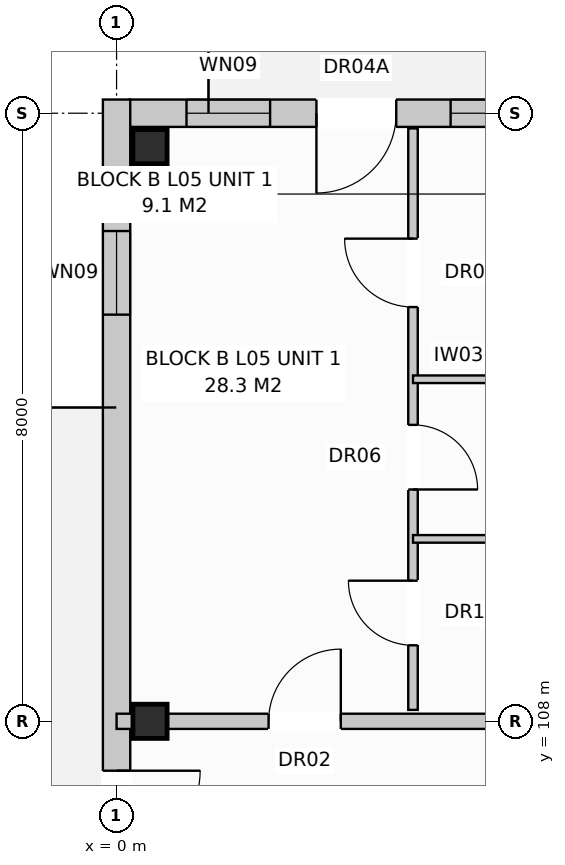
"""IFC4 building model, lengths in metres.
Left out: names, types, materials, properties, quantities, classifications, styles, units other than length and angle.
Written with IfcOpenShell. Run it as: python <this file> out.ifc"""

import sys

from ifc_helpers import new_model, si_unit, direction, frame, frame_2d, origin, origin_with_axes, origin_2d, place, context, subcontext, project, spatial, rectangle, extrude, element, fill, save


model = new_model("IFC4")
c1 = context("Model", 3, precision=1e-05, world=origin(), true_north=direction((0.0, 1.0)))
c2 = subcontext(c1, "Body", "Model", "MODEL_VIEW")
j1 = project(units=[si_unit("LENGTHUNIT", "METRE"), si_unit("PLANEANGLEUNIT", "RADIAN")], contexts=[c1])
p1 = place(None, origin())
s1 = spatial("IfcSite", under=j1, at=p1, CompositionType="ELEMENT")
p2 = place(p1, origin())
s2 = spatial("IfcBuilding", under=s1, at=p2, CompositionType="ELEMENT")
p3 = place(p2, frame((0.0, 0.0, 17.6)))
s3 = spatial("IfcBuildingStorey", under=s2, at=p3, CompositionType="ELEMENT", Elevation=17.6)
for number, where, z_axis, x_axis in (
    (1, (0.44, 108.0, 0.0), (0.0, 0.0, 1.0), (1.0, 0.0, 0.0)),
    (2, (0.44, 115.56, 0.0), (0.0, 0.0, 1.0), (1.0, 0.0, 0.0)),
):
    element("IfcColumn", number, at=place(p3, frame(where, z_axis=z_axis, x_axis=x_axis)), inside=s3, PredefinedType="COLUMN", context=c2, shape_type="SweptSolid", body=[
        extrude(rectangle(XDim=0.45, YDim=0.45, at=origin_2d()), origin(), (0.0, 0.0, 1.0), 3.2),
    ])
p4 = place(p3, frame((0.17, 116.0, 0.0), z_axis=(0.0, 0.0, 1.0), x_axis=(1.0, 0.0, 0.0)))
e3 = element("IfcWall", 3, at=p4, inside=s3, PredefinedType="STANDARD", context=c2, shape_type="SweptSolid", body=[
    extrude(rectangle(XDim=54.86, YDim=0.36, at=frame_2d((27.43, 0.0))), origin(), (0.0, 0.0, 1.0), 2.95),
])
p5 = place(p4, frame((2.459, 0.0, 0.0)))
e4 = element("IfcOpeningElement", 4, at=p5, cuts=e3, PredefinedType="OPENING", context=c2, shape_type="SweptSolid", body=[
    extrude(rectangle(XDim=1.05, YDim=2.12, at=frame_2d((0.525, 1.06))), frame((0.0, 0.192, 0.0), z_axis=(0.0, -1.0, 0.0), x_axis=(1.0, 0.0, 0.0)), (0.0, 0.0, 1.0), 0.384),
])
p6 = place(p4, frame((18.85, 0.0, 0.0)))
e5 = element("IfcOpeningElement", 5, at=p6, cuts=e3, PredefinedType="OPENING", context=c2, shape_type="SweptSolid", body=[
    extrude(rectangle(XDim=1.05, YDim=2.12, at=frame_2d((0.525, 1.06))), frame((0.0, 0.192, 0.0), z_axis=(0.0, -1.0, 0.0), x_axis=(1.0, 0.0, 0.0)), (0.0, 0.0, 1.0), 0.384),
])
p7 = place(p4, frame((28.76, 0.0, 0.0)))
e6 = element("IfcOpeningElement", 6, at=p7, cuts=e3, PredefinedType="OPENING", context=c2, shape_type="SweptSolid", body=[
    extrude(rectangle(XDim=1.05, YDim=2.12, at=frame_2d((0.525, 1.06))), frame((0.0, 0.192, 0.0), z_axis=(0.0, -1.0, 0.0), x_axis=(1.0, 0.0, 0.0)), (0.0, 0.0, 1.0), 0.384),
])
p8 = place(p4, frame((46.45, 0.0, 0.0)))
e7 = element("IfcOpeningElement", 7, at=p8, cuts=e3, PredefinedType="OPENING", context=c2, shape_type="SweptSolid", body=[
    extrude(rectangle(XDim=1.05, YDim=2.12, at=frame_2d((0.525, 1.06))), frame((0.0, 0.192, 0.0), z_axis=(0.0, -1.0, 0.0), x_axis=(1.0, 0.0, 0.0)), (0.0, 0.0, 1.0), 0.384),
])
p9 = place(p4, frame((0.75, 0.0, 0.72)))
e8 = element("IfcOpeningElement", 8, at=p9, cuts=e3, PredefinedType="OPENING", context=c2, shape_type="SweptSolid", body=[
    extrude(rectangle(XDim=1.1, YDim=1.5, at=frame_2d((0.55, 0.75))), frame((0.0, 0.192, 0.0), z_axis=(0.0, -1.0, 0.0), x_axis=(1.0, 0.0, 0.0)), (0.0, 0.0, 1.0), 0.384),
])
p10 = place(p4, frame((4.225, 0.0, 0.8)))
e9 = element("IfcOpeningElement", 9, at=p10, cuts=e3, PredefinedType="OPENING", context=c2, shape_type="SweptSolid", body=[
    extrude(rectangle(XDim=1.95, YDim=1.65, at=frame_2d((0.975, 0.825))), frame((0.0, 0.192, 0.0), z_axis=(0.0, -1.0, 0.0), x_axis=(1.0, 0.0, 0.0)), (0.0, 0.0, 1.0), 0.384),
])
p11 = place(p4, frame((8.0, 0.0, 0.8)))
e10 = element("IfcOpeningElement", 10, at=p11, cuts=e3, PredefinedType="OPENING", context=c2, shape_type="SweptSolid", body=[
    extrude(rectangle(XDim=1.8, YDim=1.7, at=frame_2d((0.9, 0.85))), frame((0.0, 0.192, 0.0), z_axis=(0.0, -1.0, 0.0), x_axis=(1.0, 0.0, 0.0)), (0.0, 0.0, 1.0), 0.384),
])
p12 = place(p4, frame((11.65, 0.0, 0.72)))
e11 = element("IfcOpeningElement", 11, at=p12, cuts=e3, PredefinedType="OPENING", context=c2, shape_type="SweptSolid", body=[
    extrude(rectangle(XDim=1.1, YDim=1.5, at=frame_2d((0.55, 0.75))), frame((0.0, 0.192, 0.0), z_axis=(0.0, -1.0, 0.0), x_axis=(1.0, 0.0, 0.0)), (0.0, 0.0, 1.0), 0.384),
])
p13 = place(p4, frame((16.675, 0.0, 0.8)))
e12 = element("IfcOpeningElement", 12, at=p13, cuts=e3, PredefinedType="OPENING", context=c2, shape_type="SweptSolid", body=[
    extrude(rectangle(XDim=1.95, YDim=1.65, at=frame_2d((0.975, 0.825))), frame((0.0, 0.192, 0.0), z_axis=(0.0, -1.0, 0.0), x_axis=(1.0, 0.0, 0.0)), (0.0, 0.0, 1.0), 0.384),
])
p14 = place(p4, frame((22.3, 0.0, 0.8)))
e13 = element("IfcOpeningElement", 13, at=p14, cuts=e3, PredefinedType="OPENING", context=c2, shape_type="SweptSolid", body=[
    extrude(rectangle(XDim=1.8, YDim=1.7, at=frame_2d((0.9, 0.85))), frame((0.0, 0.192, 0.0), z_axis=(0.0, -1.0, 0.0), x_axis=(1.0, 0.0, 0.0)), (0.0, 0.0, 1.0), 0.384),
])
p15 = place(p4, frame((31.15, 0.0, 0.72)))
e14 = element("IfcOpeningElement", 14, at=p15, cuts=e3, PredefinedType="OPENING", context=c2, shape_type="SweptSolid", body=[
    extrude(rectangle(XDim=1.9, YDim=1.85, at=frame_2d((0.95, 0.925))), frame((0.0, 0.192, 0.0), z_axis=(0.0, -1.0, 0.0), x_axis=(1.0, 0.0, 0.0)), (0.0, 0.0, 1.0), 0.384),
])
p16 = place(p4, frame((36.525, 0.0, 0.8)))
e15 = element("IfcOpeningElement", 15, at=p16, cuts=e3, PredefinedType="OPENING", context=c2, shape_type="SweptSolid", body=[
    extrude(rectangle(XDim=1.95, YDim=1.65, at=frame_2d((0.975, 0.825))), frame((0.0, 0.192, 0.0), z_axis=(0.0, -1.0, 0.0), x_axis=(1.0, 0.0, 0.0)), (0.0, 0.0, 1.0), 0.384),
])
p17 = place(p4, frame((42.3, 0.0, 0.8)))
e16 = element("IfcOpeningElement", 16, at=p17, cuts=e3, PredefinedType="OPENING", context=c2, shape_type="SweptSolid", body=[
    extrude(rectangle(XDim=1.8, YDim=1.7, at=frame_2d((0.9, 0.85))), frame((0.0, 0.192, 0.0), z_axis=(0.0, -1.0, 0.0), x_axis=(1.0, 0.0, 0.0)), (0.0, 0.0, 1.0), 0.384),
])
p18 = place(p4, frame((49.05, 0.0, 0.72)))
e17 = element("IfcOpeningElement", 17, at=p18, cuts=e3, PredefinedType="OPENING", context=c2, shape_type="SweptSolid", body=[
    extrude(rectangle(XDim=1.1, YDim=1.5, at=frame_2d((0.55, 0.75))), frame((0.0, 0.192, 0.0), z_axis=(0.0, -1.0, 0.0), x_axis=(1.0, 0.0, 0.0)), (0.0, 0.0, 1.0), 0.384),
])
p19 = place(p4, frame((52.025, 0.0, 0.8)))
e18 = element("IfcOpeningElement", 18, at=p19, cuts=e3, PredefinedType="OPENING", context=c2, shape_type="SweptSolid", body=[
    extrude(rectangle(XDim=1.95, YDim=1.65, at=frame_2d((0.975, 0.825))), frame((0.0, 0.192, 0.0), z_axis=(0.0, -1.0, 0.0), x_axis=(1.0, 0.0, 0.0)), (0.0, 0.0, 1.0), 0.384),
])
p20 = place(p3, frame((0.0, 97.42, 0.0), z_axis=(0.0, 0.0, 1.0), x_axis=(0.0, 1.0, 0.0)))
e19 = element("IfcWall", 19, at=p20, inside=s3, PredefinedType="STANDARD", context=c2, shape_type="SweptSolid", body=[
    extrude(rectangle(XDim=18.76, YDim=0.36, at=frame_2d((9.38, 0.0))), origin(), (0.0, 0.0, 1.0), 2.95),
])
p21 = place(p20, frame((8.83, 0.0, 0.0)))
e20 = element("IfcOpeningElement", 20, at=p21, cuts=e19, PredefinedType="OPENING", context=c2, shape_type="SweptSolid", body=[
    extrude(rectangle(XDim=1.1, YDim=2.1, at=frame_2d((0.55, 1.05))), frame((0.0, 0.192, 0.0), z_axis=(0.0, -1.0, 0.0), x_axis=(1.0, 0.0, 0.0)), (0.0, 0.0, 1.0), 0.384),
])
p22 = place(p20, frame((1.73, 0.0, 0.72)))
e21 = element("IfcOpeningElement", 21, at=p22, cuts=e19, PredefinedType="OPENING", context=c2, shape_type="SweptSolid", body=[
    extrude(rectangle(XDim=1.1, YDim=1.5, at=frame_2d((0.55, 0.75))), frame((0.0, 0.192, 0.0), z_axis=(0.0, -1.0, 0.0), x_axis=(1.0, 0.0, 0.0)), (0.0, 0.0, 1.0), 0.384),
])
p23 = place(p20, frame((15.93, 0.0, 0.72)))
e22 = element("IfcOpeningElement", 22, at=p23, cuts=e19, PredefinedType="OPENING", context=c2, shape_type="SweptSolid", body=[
    extrude(rectangle(XDim=1.1, YDim=1.5, at=frame_2d((0.55, 0.75))), frame((0.0, 0.192, 0.0), z_axis=(0.0, -1.0, 0.0), x_axis=(1.0, 0.0, 0.0)), (0.0, 0.0, 1.0), 0.384),
])
p24 = place(p3, frame((0.0, 108.0, 0.0), z_axis=(0.0, 0.0, 1.0), x_axis=(1.0, 0.0, 0.0)))
e23 = element("IfcWall", 23, at=p24, inside=s3, PredefinedType="PARTITIONING", context=c2, shape_type="SweptSolid", body=[
    extrude(rectangle(XDim=6.9, YDim=0.2, at=frame_2d((3.45, 0.0))), origin(), (0.0, 0.0, 1.0), 2.39),
])
p25 = place(p24, frame((2.0, 0.0, 0.0)))
e24 = element("IfcOpeningElement", 24, at=p25, cuts=e23, PredefinedType="OPENING", context=c2, shape_type="SweptSolid", body=[
    extrude(rectangle(XDim=0.95, YDim=2.15, at=frame_2d((0.475, 1.075))), frame((0.0, 0.112, 0.0), z_axis=(0.0, -1.0, 0.0), x_axis=(1.0, 0.0, 0.0)), (0.0, 0.0, 1.0), 0.224),
])
p26 = place(p3, frame((3.9, 108.15, 0.0), z_axis=(0.0, 0.0, 1.0), x_axis=(0.0, 1.0, 0.0)))
e25 = element("IfcWall", 25, at=p26, inside=s3, PredefinedType="PARTITIONING", context=c2, shape_type="SweptSolid", body=[
    extrude(rectangle(XDim=7.65, YDim=0.125, at=frame_2d((3.825, 0.0))), origin(), (0.0, 0.0, 1.0), 2.95),
])
p27 = place(p26, frame((0.85, 0.0, 0.0)))
e26 = element("IfcOpeningElement", 26, at=p27, cuts=e25, PredefinedType="OPENING", context=c2, shape_type="SweptSolid", body=[
    extrude(rectangle(XDim=0.85, YDim=2.1, at=frame_2d((0.425, 1.05))), frame((0.0, 0.074, 0.0), z_axis=(0.0, -1.0, 0.0), x_axis=(1.0, 0.0, 0.0)), (0.0, 0.0, 1.0), 0.149),
])
p28 = place(p26, frame((2.9, 0.0, 0.0)))
e27 = element("IfcOpeningElement", 27, at=p28, cuts=e25, PredefinedType="OPENING", context=c2, shape_type="SweptSolid", body=[
    extrude(rectangle(XDim=0.85, YDim=2.05, at=frame_2d((0.425, 1.025))), frame((0.0, 0.074, 0.0), z_axis=(0.0, -1.0, 0.0), x_axis=(1.0, 0.0, 0.0)), (0.0, 0.0, 1.0), 0.149),
])
p29 = place(p26, frame((5.3, 0.0, 0.0)))
e28 = element("IfcOpeningElement", 28, at=p29, cuts=e25, PredefinedType="OPENING", context=c2, shape_type="SweptSolid", body=[
    extrude(rectangle(XDim=0.9, YDim=2.1, at=frame_2d((0.45, 1.05))), frame((0.0, 0.074, 0.0), z_axis=(0.0, -1.0, 0.0), x_axis=(1.0, 0.0, 0.0)), (0.0, 0.0, 1.0), 0.149),
])
for number, where, z_axis, x_axis in (
    (29, (3.9, 110.4, 0.0), (0.0, 0.0, 1.0), (1.0, 0.0, 0.0)),
    (30, (3.9, 112.5, 0.0), (0.0, 0.0, 1.0), (1.0, 0.0, 0.0)),
):
    element("IfcWall", number, at=place(p3, frame(where, z_axis=z_axis, x_axis=x_axis)), inside=s3, PredefinedType="PARTITIONING", context=c2, shape_type="SweptSolid", body=[
        extrude(rectangle(XDim=2.9, YDim=0.1, at=frame_2d((1.45, 0.0))), origin(), (0.0, 0.0, 1.0), 2.95),
    ])
p30 = place(p5, frame((1.05, 0.0, 0.0), z_axis=(0.0, 0.0, 1.0), x_axis=(-1.0, 0.0, 0.0)))
e31 = element("IfcDoor", 31, at=p30, inside=s3, OperationType="SINGLE_SWING_LEFT", PredefinedType="DOOR", context=c2, shape_type="SweptSolid", body=[
    extrude(rectangle(XDim=1.05, YDim=2.12, at=frame_2d((0.525, 1.06))), frame((0.0, 0.025, 0.0), z_axis=(0.0, -1.0, 0.0), x_axis=(1.0, 0.0, 0.0)), (0.0, 0.0, 1.0), 0.05),
])
fill(e4, e31)
p31 = place(p9, origin_with_axes())
e32 = element("IfcWindow", 32, at=p31, inside=s3, PartitioningType="SINGLE_PANEL", PredefinedType="WINDOW", context=c2, shape_type="SweptSolid", body=[
    extrude(rectangle(XDim=1.1, YDim=1.5, at=frame_2d((0.55, 0.75))), frame((0.0, 0.03, 0.0), z_axis=(0.0, -1.0, 0.0), x_axis=(1.0, 0.0, 0.0)), (0.0, 0.0, 1.0), 0.06),
])
fill(e8, e32)
p32 = place(p10, origin_with_axes())
e33 = element("IfcWindow", 33, at=p32, inside=s3, PartitioningType="SINGLE_PANEL", PredefinedType="WINDOW", context=c2, shape_type="SweptSolid", body=[
    extrude(rectangle(XDim=1.95, YDim=1.65, at=frame_2d((0.975, 0.825))), frame((0.0, 0.03, 0.0), z_axis=(0.0, -1.0, 0.0), x_axis=(1.0, 0.0, 0.0)), (0.0, 0.0, 1.0), 0.06),
])
fill(e9, e33)
p33 = place(p21, frame((1.1, 0.0, 0.0), z_axis=(0.0, 0.0, 1.0), x_axis=(-1.0, 0.0, 0.0)))
e34 = element("IfcDoor", 34, at=p33, inside=s3, OperationType="SINGLE_SWING_RIGHT", PredefinedType="DOOR", context=c2, shape_type="SweptSolid", body=[
    extrude(rectangle(XDim=1.1, YDim=2.1, at=frame_2d((0.55, 1.05))), frame((0.0, 0.025, 0.0), z_axis=(0.0, -1.0, 0.0), x_axis=(1.0, 0.0, 0.0)), (0.0, 0.0, 1.0), 0.05),
])
fill(e20, e34)
p34 = place(p23, origin_with_axes())
e35 = element("IfcWindow", 35, at=p34, inside=s3, PartitioningType="SINGLE_PANEL", PredefinedType="WINDOW", context=c2, shape_type="SweptSolid", body=[
    extrude(rectangle(XDim=1.1, YDim=1.5, at=frame_2d((0.55, 0.75))), frame((0.0, 0.03, 0.0), z_axis=(0.0, -1.0, 0.0), x_axis=(1.0, 0.0, 0.0)), (0.0, 0.0, 1.0), 0.06),
])
fill(e22, e35)
p35 = place(p25, origin_with_axes())
e36 = element("IfcDoor", 36, at=p35, inside=s3, OperationType="SINGLE_SWING_RIGHT", PredefinedType="DOOR", context=c2, shape_type="SweptSolid", body=[
    extrude(rectangle(XDim=0.95, YDim=2.15, at=frame_2d((0.475, 1.075))), frame((0.0, 0.025, 0.0), z_axis=(0.0, -1.0, 0.0), x_axis=(1.0, 0.0, 0.0)), (0.0, 0.0, 1.0), 0.05),
])
fill(e24, e36)
p36 = place(p27, origin_with_axes())
e37 = element("IfcDoor", 37, at=p36, inside=s3, OperationType="SINGLE_SWING_RIGHT", PredefinedType="DOOR", context=c2, shape_type="SweptSolid", body=[
    extrude(rectangle(XDim=0.85, YDim=2.1, at=frame_2d((0.425, 1.05))), frame((0.0, 0.025, 0.0), z_axis=(0.0, -1.0, 0.0), x_axis=(1.0, 0.0, 0.0)), (0.0, 0.0, 1.0), 0.05),
])
fill(e26, e37)
p37 = place(p28, frame((0.85, 0.0, 0.0), z_axis=(0.0, 0.0, 1.0), x_axis=(-1.0, 0.0, 0.0)))
e38 = element("IfcDoor", 38, at=p37, inside=s3, OperationType="SINGLE_SWING_LEFT", PredefinedType="DOOR", context=c2, shape_type="SweptSolid", body=[
    extrude(rectangle(XDim=0.85, YDim=2.05, at=frame_2d((0.425, 1.025))), frame((0.0, 0.025, 0.0), z_axis=(0.0, -1.0, 0.0), x_axis=(1.0, 0.0, 0.0)), (0.0, 0.0, 1.0), 0.05),
])
fill(e27, e38)
p38 = place(p29, origin_with_axes())
e39 = element("IfcDoor", 39, at=p38, inside=s3, OperationType="SINGLE_SWING_RIGHT", PredefinedType="DOOR", context=c2, shape_type="SweptSolid", body=[
    extrude(rectangle(XDim=0.9, YDim=2.1, at=frame_2d((0.45, 1.05))), frame((0.0, 0.025, 0.0), z_axis=(0.0, -1.0, 0.0), x_axis=(1.0, 0.0, 0.0)), (0.0, 0.0, 1.0), 0.05),
])
fill(e28, e39)
save(model, sys.argv[1])
